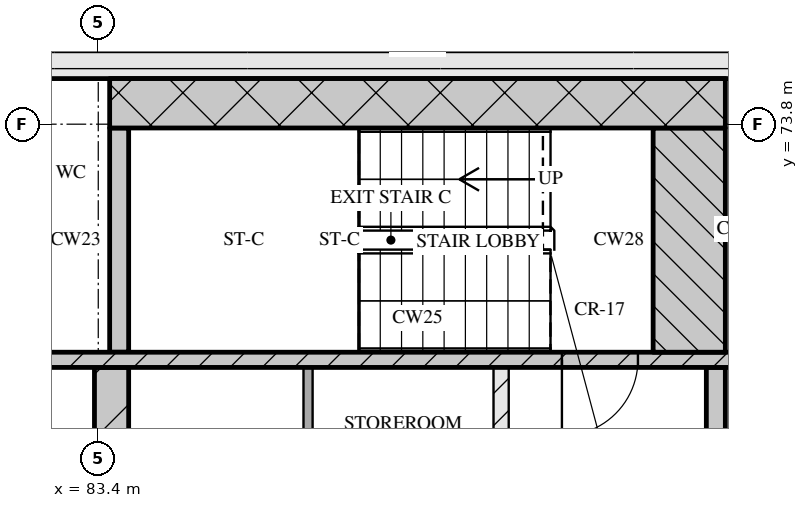
"""IFC4 building model, lengths in metres.
Left out: names, types, materials, properties, quantities, classifications, styles, units other than length and angle.
Written with IfcOpenShell. Run it as: python <this file> out.ifc"""

import sys

from ifc_helpers import new_model, si_unit, direction, frame, frame_2d, origin, place, context, subcontext, project, spatial, rectangle, extrude, element, fill, save


model = new_model("IFC4")
c1 = context("Model", 3, precision=1e-05, world=origin(), true_north=direction((0.0, 1.0)))
c2 = subcontext(c1, "Body", "Model", "MODEL_VIEW")
j1 = project(units=[si_unit("LENGTHUNIT", "METRE"), si_unit("PLANEANGLEUNIT", "RADIAN")], contexts=[c1])
p1 = place(None, origin())
s1 = spatial("IfcSite", under=j1, at=p1, CompositionType="ELEMENT")
p2 = place(p1, origin())
s2 = spatial("IfcBuilding", under=s1, at=p2, CompositionType="ELEMENT")
p3 = place(p2, frame((0.0, 0.0, 303.15)))
s3 = spatial("IfcBuildingStorey", under=s2, at=p3, CompositionType="ELEMENT", Elevation=303.15)
p4 = place(p3, frame((67.3, 74.65, 0.0), z_axis=(0.0, 0.0, 1.0), x_axis=(1.0, 0.0, 0.0)))
e1 = element("IfcWall", 1, at=p4, inside=s3, PredefinedType="SOLIDWALL", context=c2, shape_type="SweptSolid", body=[
    extrude(rectangle(XDim=40.6, YDim=0.5, at=frame_2d((20.3, 0.0))), origin(), (0.0, 0.0, 1.0), 3.32),
])
p5 = place(p3, frame((83.575, 68.0, 0.0), z_axis=(0.0, 0.0, 1.0), x_axis=(0.0, 1.0, 0.0)))
e2 = element("IfcWall", 2, at=p5, inside=s3, PredefinedType="SOLIDWALL", context=c2, shape_type="SweptSolid", body=[
    extrude(rectangle(XDim=2.6, YDim=0.45, at=frame_2d((1.3, 0.0))), origin(), (0.0, 0.0, 1.0), 3.32),
])
p6 = place(p3, frame((86.16, 68.0, 0.0), z_axis=(0.0, 0.0, 1.0), x_axis=(0.0, 1.0, 0.0)))
e3 = element("IfcWall", 3, at=p6, inside=s3, PredefinedType="PARTITIONING", context=c2, shape_type="SweptSolid", body=[
    extrude(rectangle(XDim=2.6, YDim=0.12, at=frame_2d((1.3, 0.0))), origin(), (0.0, 0.0, 1.0), 3.32),
])
p7 = place(p3, frame((88.7, 68.0, 0.0), z_axis=(0.0, 0.0, 1.0), x_axis=(0.0, 1.0, 0.0)))
e4 = element("IfcWall", 4, at=p7, inside=s3, PredefinedType="PARTITIONING", context=c2, shape_type="SweptSolid", body=[
    extrude(rectangle(XDim=2.6, YDim=0.2, at=frame_2d((1.3, 0.0))), origin(), (0.0, 0.0, 1.0), 3.32),
])
p8 = place(p3, frame((91.525, 68.0, 0.0), z_axis=(0.0, 0.0, 1.0), x_axis=(0.0, 1.0, 0.0)))
e5 = element("IfcWall", 5, at=p8, inside=s3, PredefinedType="SOLIDWALL", context=c2, shape_type="SweptSolid", body=[
    extrude(rectangle(XDim=2.6, YDim=0.25, at=frame_2d((1.3, 0.0))), origin(), (0.0, 0.0, 1.0), 3.32),
])
p9 = place(p3, frame((67.8, 70.7, 0.0), z_axis=(0.0, 0.0, 1.0), x_axis=(1.0, 0.0, 0.0)))
e6 = element("IfcWall", 6, at=p9, inside=s3, PredefinedType="SOLIDWALL", context=c2, shape_type="SweptSolid", body=[
    extrude(rectangle(XDim=39.6, YDim=0.2, at=frame_2d((19.8, 0.0))), origin(), (0.0, 0.0, 1.0), 3.32),
])
p10 = place(p9, frame((0.65, 0.0, 0.0)))
e7 = element("IfcOpeningElement", 7, at=p10, cuts=e6, PredefinedType="OPENING", context=c2, shape_type="SweptSolid", body=[
    extrude(rectangle(XDim=1.1, YDim=2.1, at=frame_2d((0.55, 1.05))), frame((0.0, 0.11, 0.0), z_axis=(0.0, -1.0, 0.0), x_axis=(1.0, 0.0, 0.0)), (0.0, 0.0, 1.0), 0.22),
])
p11 = place(p9, frame((3.25, 0.0, 0.0)))
e8 = element("IfcOpeningElement", 8, at=p11, cuts=e6, PredefinedType="OPENING", context=c2, shape_type="SweptSolid", body=[
    extrude(rectangle(XDim=1.1, YDim=2.1, at=frame_2d((0.55, 1.05))), frame((0.0, 0.11, 0.0), z_axis=(0.0, -1.0, 0.0), x_axis=(1.0, 0.0, 0.0)), (0.0, 0.0, 1.0), 0.22),
])
p12 = place(p9, frame((5.9, 0.0, 0.0)))
e9 = element("IfcOpeningElement", 9, at=p12, cuts=e6, PredefinedType="OPENING", context=c2, shape_type="SweptSolid", body=[
    extrude(rectangle(XDim=1.0, YDim=2.1, at=frame_2d((0.5, 1.05))), frame((0.0, 0.11, 0.0), z_axis=(0.0, -1.0, 0.0), x_axis=(1.0, 0.0, 0.0)), (0.0, 0.0, 1.0), 0.22),
])
p13 = place(p9, frame((21.7, 0.0, 0.0)))
e10 = element("IfcOpeningElement", 10, at=p13, cuts=e6, PredefinedType="OPENING", context=c2, shape_type="SweptSolid", body=[
    extrude(rectangle(XDim=1.0, YDim=2.1, at=frame_2d((0.5, 1.05))), frame((0.0, 0.11, 0.0), z_axis=(0.0, -1.0, 0.0), x_axis=(1.0, 0.0, 0.0)), (0.0, 0.0, 1.0), 0.22),
])
p14 = place(p9, frame((32.7, 0.0, 0.0)))
e11 = element("IfcOpeningElement", 11, at=p14, cuts=e6, PredefinedType="OPENING", context=c2, shape_type="SweptSolid", body=[
    extrude(rectangle(XDim=1.0, YDim=2.1, at=frame_2d((0.5, 1.05))), frame((0.0, 0.11, 0.0), z_axis=(0.0, -1.0, 0.0), x_axis=(1.0, 0.0, 0.0)), (0.0, 0.0, 1.0), 0.22),
])
p15 = place(p9, frame((35.25, 0.0, 0.0)))
e12 = element("IfcOpeningElement", 12, at=p15, cuts=e6, PredefinedType="OPENING", context=c2, shape_type="SweptSolid", body=[
    extrude(rectangle(XDim=1.1, YDim=2.1, at=frame_2d((0.55, 1.05))), frame((0.0, 0.11, 0.0), z_axis=(0.0, -1.0, 0.0), x_axis=(1.0, 0.0, 0.0)), (0.0, 0.0, 1.0), 0.22),
])
p16 = place(p9, frame((37.85, 0.0, 0.0)))
e13 = element("IfcOpeningElement", 13, at=p16, cuts=e6, PredefinedType="OPENING", context=c2, shape_type="SweptSolid", body=[
    extrude(rectangle(XDim=1.1, YDim=2.1, at=frame_2d((0.55, 1.05))), frame((0.0, 0.11, 0.0), z_axis=(0.0, -1.0, 0.0), x_axis=(1.0, 0.0, 0.0)), (0.0, 0.0, 1.0), 0.22),
])
p17 = place(p3, frame((83.675, 70.8, 0.0), z_axis=(0.0, 0.0, 1.0), x_axis=(0.0, 1.0, 0.0)))
e14 = element("IfcWall", 14, at=p17, inside=s3, PredefinedType="SOLIDWALL", context=c2, shape_type="SweptSolid", body=[
    extrude(rectangle(XDim=2.95, YDim=0.25, at=frame_2d((1.475, 0.0))), origin(), (0.0, 0.0, 1.0), 3.32),
])
p18 = place(p3, frame((91.175, 70.8, 0.0), z_axis=(0.0, 0.0, 1.0), x_axis=(0.0, 1.0, 0.0)))
e15 = element("IfcWall", 15, at=p18, inside=s3, PredefinedType="SOLIDWALL", context=c2, shape_type="SweptSolid", body=[
    extrude(rectangle(XDim=2.95, YDim=0.95, at=frame_2d((1.475, 0.0))), origin(), (0.0, 0.0, 1.0), 3.32),
])
p19 = place(p3, frame((83.55, 74.075, 0.0), z_axis=(0.0, 0.0, 1.0), x_axis=(1.0, 0.0, 0.0)))
e16 = element("IfcWall", 16, at=p19, inside=s3, PredefinedType="SOLIDWALL", context=c2, shape_type="SweptSolid", body=[
    extrude(rectangle(XDim=8.1, YDim=0.65, at=frame_2d((4.05, 0.0))), origin(), (0.0, 0.0, 1.0), 3.32),
])
p20 = place(p13, origin())
e17 = element("IfcDoor", 17, at=p20, inside=s3, OperationType="SINGLE_SWING_RIGHT", PredefinedType="DOOR", context=c2, shape_type="SweptSolid", body=[
    extrude(rectangle(XDim=1.0, YDim=2.1, at=frame_2d((0.5, 1.05))), frame((0.0, 0.025, 0.0), z_axis=(0.0, -1.0, 0.0), x_axis=(1.0, 0.0, 0.0)), (0.0, 0.0, 1.0), 0.05),
])
fill(e10, e17)
save(model, sys.argv[1])
